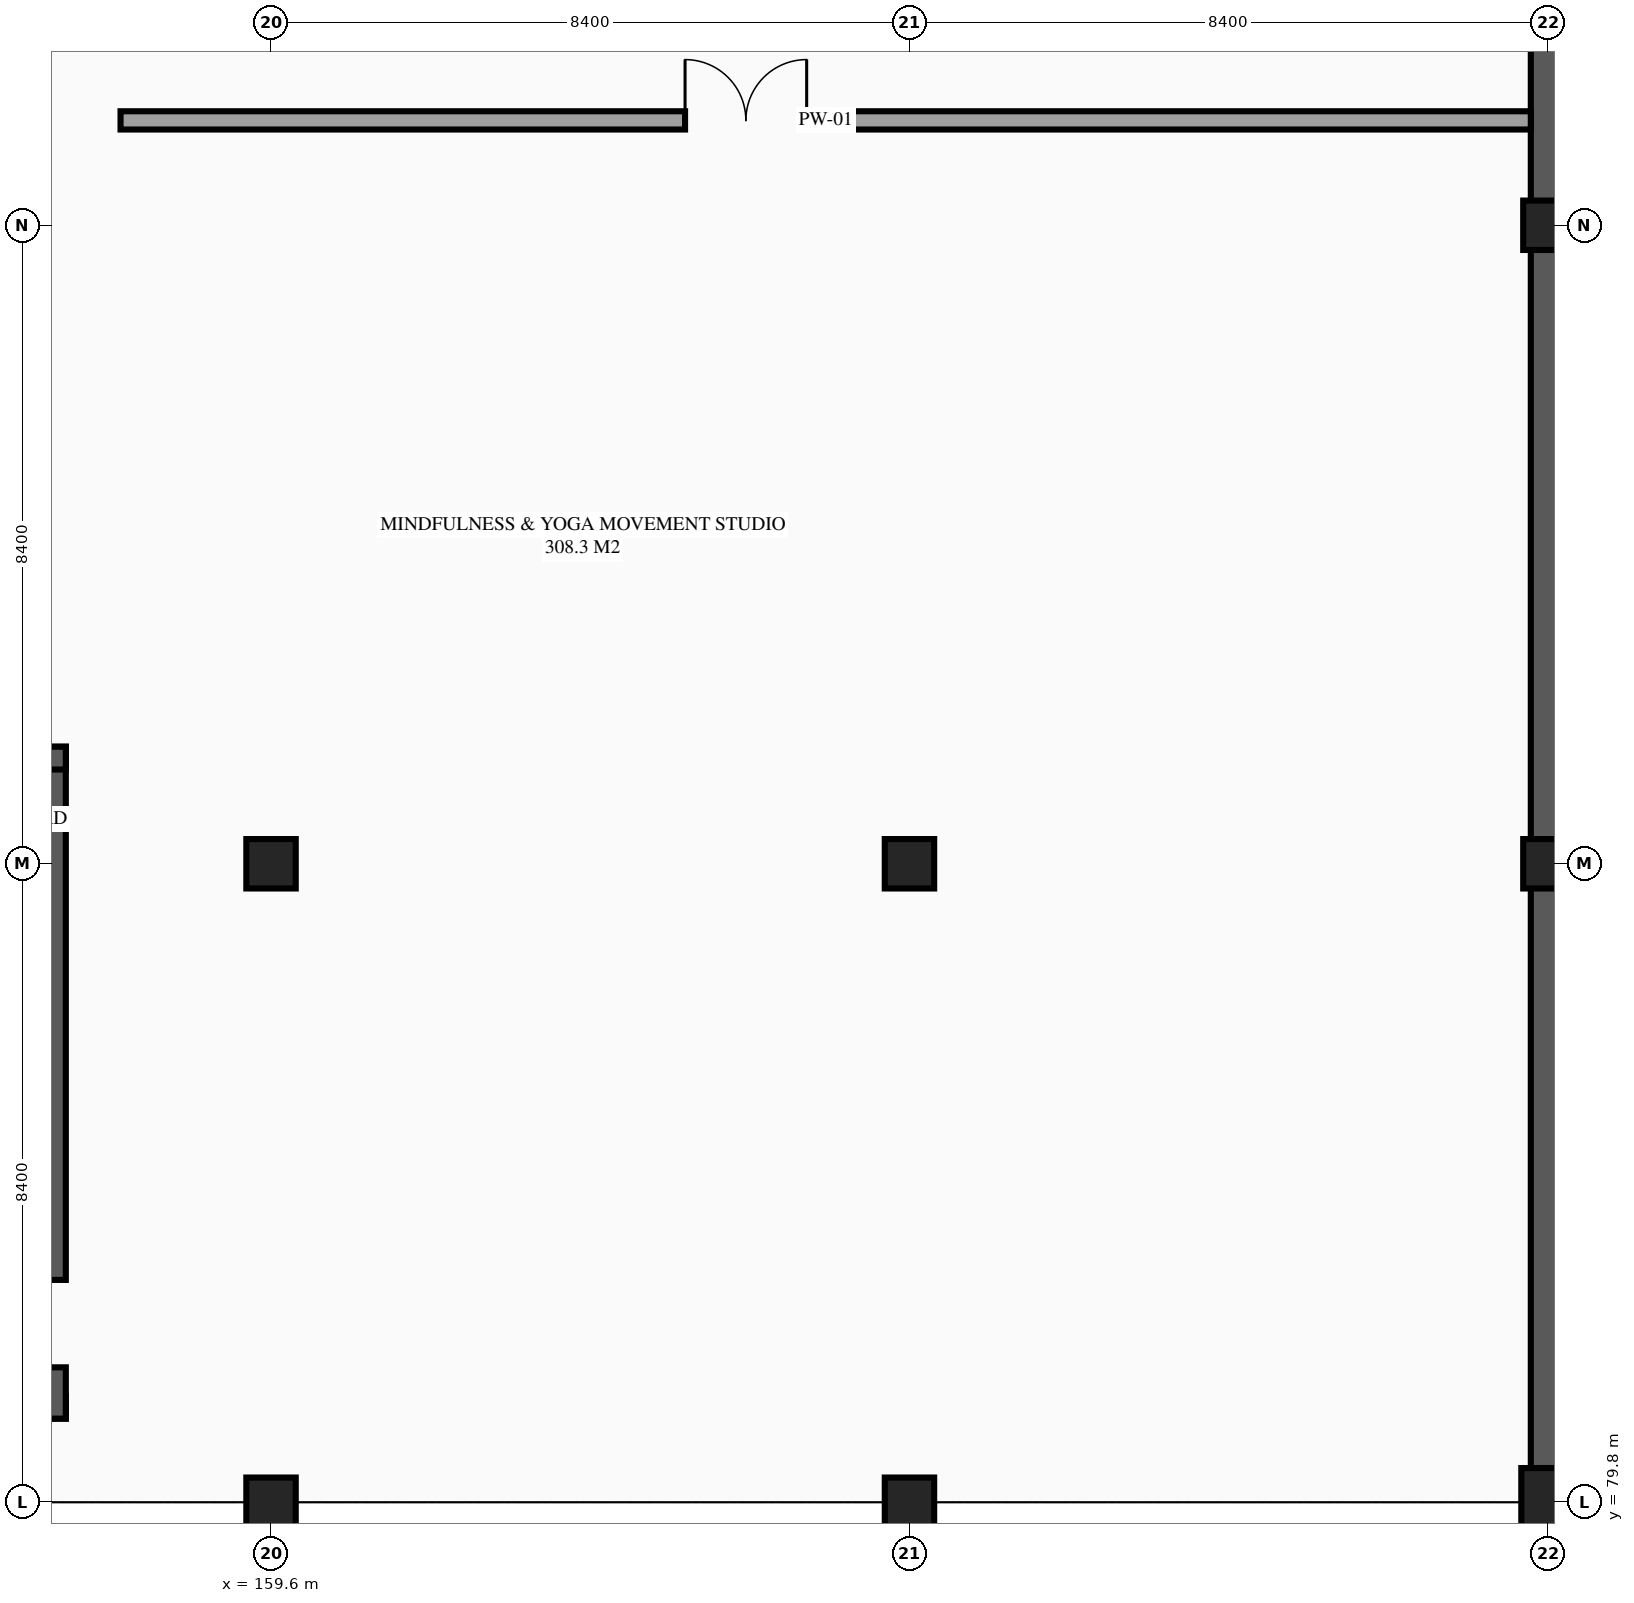
"""IFC4 building model, lengths in metres.
Left out: names, types, materials, properties, quantities, classifications, styles, units other than length and angle.
Written with IfcOpenShell. Run it as: python <this file> out.ifc"""

import sys

from ifc_helpers import new_model, si_unit, direction, frame, frame_2d, origin, origin_2d, place, context, subcontext, project, spatial, rectangle, extrude, element, fill, save


model = new_model("IFC4")
c1 = context("Model", 3, precision=1e-05, world=origin(), true_north=direction((0.0, 1.0)))
c2 = subcontext(c1, "Body", "Model", "MODEL_VIEW")
j1 = project(units=[si_unit("LENGTHUNIT", "METRE"), si_unit("PLANEANGLEUNIT", "RADIAN")], contexts=[c1])
p1 = place(None, origin())
s1 = spatial("IfcSite", under=j1, at=p1, CompositionType="ELEMENT")
p2 = place(p1, origin())
s2 = spatial("IfcBuilding", under=s1, at=p2, CompositionType="ELEMENT")
p3 = place(p2, frame((0.0, 0.0, 9.9)))
s3 = spatial("IfcBuildingStorey", under=s2, at=p3, CompositionType="ELEMENT", Elevation=9.9)
for number, where, z_axis, x_axis in (
    (1, (159.6, 79.8, 0.0), (0.0, 0.0, 1.0), (1.0, 0.0, 0.0)),
    (2, (159.6, 88.2, 0.0), (0.0, 0.0, 1.0), (1.0, 0.0, 0.0)),
    (3, (168.0, 79.8, 0.0), (0.0, 0.0, 1.0), (1.0, 0.0, 0.0)),
    (4, (168.0, 88.2, 0.0), (0.0, 0.0, 1.0), (1.0, 0.0, 0.0)),
):
    element("IfcColumn", number, at=place(p3, frame(where, z_axis=z_axis, x_axis=x_axis)), inside=s3, PredefinedType="COLUMN", context=c2, shape_type="SweptSolid", body=[
        extrude(rectangle(XDim=0.65, YDim=0.65, at=origin_2d()), origin(), (0.0, 0.0, 1.0), 4.2),
    ])
p4 = place(p3, frame((176.4, 79.8, 0.0), z_axis=(0.0, 0.0, 1.0), x_axis=(1.0, 0.0, 0.0)))
e5 = element("IfcColumn", 5, at=p4, inside=s3, PredefinedType="COLUMN", context=c2, shape_type="SweptSolid", body=[
    extrude(rectangle(XDim=0.7, YDim=0.9, at=origin_2d()), origin(), (0.0, 0.0, 1.0), 4.2),
])
for number, where, z_axis, x_axis in (
    (6, (176.4, 88.2, 0.0), (0.0, 0.0, 1.0), (1.0, 0.0, 0.0)),
    (7, (176.4, 96.6, 0.0), (0.0, 0.0, 1.0), (1.0, 0.0, 0.0)),
):
    element("IfcColumn", number, at=place(p3, frame(where, z_axis=z_axis, x_axis=x_axis)), inside=s3, PredefinedType="COLUMN", context=c2, shape_type="SweptSolid", body=[
        extrude(rectangle(XDim=0.65, YDim=0.65, at=origin_2d()), origin(), (0.0, 0.0, 1.0), 4.2),
    ])
p5 = place(p3, frame((176.4, 71.4, 0.0), z_axis=(0.0, 0.0, 1.0), x_axis=(0.0, 1.0, 0.0)))
e8 = element("IfcWall", 8, at=p5, inside=s3, PredefinedType="STANDARD", context=c2, shape_type="SweptSolid", body=[
    extrude(rectangle(XDim=8.4, YDim=0.45, at=frame_2d((4.2, 0.0))), origin(), (0.0, 0.0, 1.0), 4.2),
])
p6 = place(p3, frame((176.4, 79.8, 0.0), z_axis=(0.0, 0.0, 1.0), x_axis=(0.0, 1.0, 0.0)))
e9 = element("IfcWall", 9, at=p6, inside=s3, PredefinedType="STANDARD", context=c2, shape_type="SweptSolid", body=[
    extrude(rectangle(XDim=8.4, YDim=0.45, at=frame_2d((4.2, 0.0))), origin(), (0.0, 0.0, 1.0), 4.2),
])
p7 = place(p3, frame((176.4, 88.2, 0.0), z_axis=(0.0, 0.0, 1.0), x_axis=(0.0, 1.0, 0.0)))
e10 = element("IfcWall", 10, at=p7, inside=s3, PredefinedType="STANDARD", context=c2, shape_type="SweptSolid", body=[
    extrude(rectangle(XDim=8.4, YDim=0.45, at=frame_2d((4.2, 0.0))), origin(), (0.0, 0.0, 1.0), 4.2),
])
p8 = place(p3, frame((176.4, 96.6, 0.0), z_axis=(0.0, 0.0, 1.0), x_axis=(0.0, 1.0, 0.0)))
e11 = element("IfcWall", 11, at=p8, inside=s3, PredefinedType="STANDARD", context=c2, shape_type="SweptSolid", body=[
    extrude(rectangle(XDim=8.4, YDim=0.45, at=frame_2d((4.2, 0.0))), origin(), (0.0, 0.0, 1.0), 4.2),
])
p9 = place(p3, frame((151.7, 81.05, 0.0), z_axis=(0.0, 0.0, 1.0), x_axis=(1.0, 0.0, 0.0)))
e12 = element("IfcWall", 12, at=p9, inside=s3, PredefinedType="SHEAR", context=c2, shape_type="SweptSolid", body=[
    extrude(rectangle(XDim=5.2, YDim=0.3, at=frame_2d((2.6, 0.0))), origin(), (0.0, 0.0, 1.0), 4.2),
])
p10 = place(p3, frame((156.75, 80.9, 0.0), z_axis=(0.0, 0.0, 1.0), x_axis=(0.0, 1.0, 0.0)))
e13 = element("IfcWall", 13, at=p10, inside=s3, PredefinedType="SHEAR", context=c2, shape_type="SweptSolid", body=[
    extrude(rectangle(XDim=8.84, YDim=0.3, at=frame_2d((4.42, 0.0))), origin(), (0.0, 0.0, 1.0), 4.2),
])
p11 = place(p10, frame((0.675, 0.0, 0.0)))
e14 = element("IfcOpeningElement", 14, at=p11, cuts=e13, PredefinedType="OPENING", context=c2, shape_type="SweptSolid", body=[
    extrude(rectangle(XDim=1.15, YDim=2.15, at=frame_2d((0.575, 1.075))), frame((0.0, 0.16, 0.0), z_axis=(0.0, -1.0, 0.0), x_axis=(1.0, 0.0, 0.0)), (0.0, 0.0, 1.0), 0.32),
])
p12 = place(p3, frame((156.9, 89.59, 0.0), z_axis=(0.0, 0.0, 1.0), x_axis=(-1.0, 0.0, 0.0)))
e15 = element("IfcWall", 15, at=p12, inside=s3, PredefinedType="SHEAR", context=c2, shape_type="SweptSolid", body=[
    extrude(rectangle(XDim=5.2, YDim=0.3, at=frame_2d((2.6, 0.0))), origin(), (0.0, 0.0, 1.0), 4.2),
])
p13 = place(p3, frame((157.62, 97.98, 0.0), z_axis=(0.0, 0.0, 1.0), x_axis=(1.0, 0.0, 0.0)))
e16 = element("IfcWall", 16, at=p13, inside=s3, PredefinedType="PARTITIONING", context=c2, shape_type="SweptSolid", body=[
    extrude(rectangle(XDim=18.555, YDim=0.24, at=frame_2d((9.277, 0.0))), origin(), (0.0, 0.0, 1.0), 3.955),
])
p14 = place(p13, frame((7.427, 0.0, 0.0)))
e17 = element("IfcOpeningElement", 17, at=p14, cuts=e16, PredefinedType="OPENING", context=c2, shape_type="SweptSolid", body=[
    extrude(rectangle(XDim=1.6, YDim=2.25, at=frame_2d((0.8, 1.125))), frame((0.0, 0.13, 0.0), z_axis=(0.0, -1.0, 0.0), x_axis=(1.0, 0.0, 0.0)), (0.0, 0.0, 1.0), 0.26),
])
p15 = place(p11, origin())
e18 = element("IfcDoor", 18, at=p15, inside=s3, OperationType="SINGLE_SWING_LEFT", PredefinedType="DOOR", context=c2, shape_type="SweptSolid", body=[
    extrude(rectangle(XDim=1.15, YDim=2.15, at=frame_2d((0.575, 1.075))), frame((0.0, 0.025, 0.0), z_axis=(0.0, -1.0, 0.0), x_axis=(1.0, 0.0, 0.0)), (0.0, 0.0, 1.0), 0.05),
])
fill(e14, e18)
p16 = place(p14, origin())
e19 = element("IfcDoor", 19, at=p16, inside=s3, OperationType="DOUBLE_DOOR_SINGLE_SWING", PredefinedType="DOOR", context=c2, shape_type="SweptSolid", body=[
    extrude(rectangle(XDim=1.6, YDim=2.25, at=frame_2d((0.8, 1.125))), frame((0.0, 0.025, 0.0), z_axis=(0.0, -1.0, 0.0), x_axis=(1.0, 0.0, 0.0)), (0.0, 0.0, 1.0), 0.05),
])
fill(e17, e19)
save(model, sys.argv[1])
